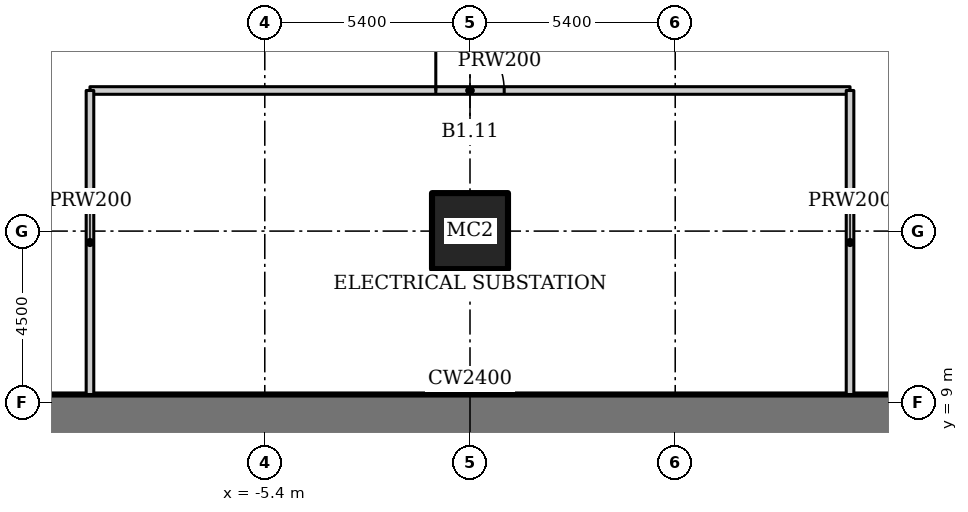
"""IFC4 building model, lengths in metres.
Left out: names, types, materials, properties, quantities, classifications, styles, units other than length and angle.
Written with IfcOpenShell. Run it as: python <this file> out.ifc"""

import sys

from ifc_helpers import new_model, si_unit, direction, frame, frame_2d, origin, origin_2d, place, context, subcontext, project, spatial, rectangle, hollow_rectangle, extrude, element, fill, save


model = new_model("IFC4")
c1 = context("Model", 3, precision=1e-05, world=origin(), true_north=direction((0.0, 1.0)))
c2 = subcontext(c1, "Body", "Model", "MODEL_VIEW")
j1 = project(units=[si_unit("LENGTHUNIT", "METRE"), si_unit("PLANEANGLEUNIT", "RADIAN")], contexts=[c1])
p1 = place(None, origin())
s1 = spatial("IfcSite", under=j1, at=p1, CompositionType="ELEMENT")
p2 = place(p1, origin())
s2 = spatial("IfcBuilding", under=s1, at=p2, CompositionType="ELEMENT")
p3 = place(p2, frame((0.0, 0.0, -5.5)))
s3 = spatial("IfcBuildingStorey", under=s2, at=p3, CompositionType="ELEMENT", Elevation=-5.5)
p4 = place(p3, frame((0.0, 13.5, 0.0), z_axis=(0.0, 0.0, 1.0), x_axis=(1.0, 0.0, 0.0)))
e1 = element("IfcColumn", 1, at=p4, inside=s3, PredefinedType="COLUMN", context=c2, shape_type="SweptSolid", body=[
    extrude(hollow_rectangle(XDim=2.0, YDim=2.0, WallThickness=0.17, at=origin_2d()), origin(), (0.0, 0.0, 1.0), 5.5),
])
p5 = place(p3, frame((12.2, 8.0, 0.0), z_axis=(0.0, 0.0, 1.0), x_axis=(-1.0, 0.0, 0.0)))
e2 = element("IfcWall", 2, at=p5, inside=s3, PredefinedType="SHEAR", context=c2, shape_type="SweptSolid", body=[
    extrude(rectangle(XDim=24.4, YDim=2.4, at=frame_2d((12.2, 0.0))), origin(), (0.0, 0.0, 1.0), 5.5),
])
p6 = place(p3, frame((-10.0, 17.2, 0.0), z_axis=(0.0, 0.0, 1.0), x_axis=(1.0, 0.0, 0.0)))
e3 = element("IfcWall", 3, at=p6, inside=s3, PredefinedType="SOLIDWALL", context=c2, shape_type="SweptSolid", body=[
    extrude(rectangle(XDim=20.0, YDim=0.2, at=frame_2d((10.0, 0.0))), origin(), (0.0, 0.0, 1.0), 5.05),
])
p7 = place(p6, frame((9.1, 0.0, 0.0)))
e4 = element("IfcOpeningElement", 4, at=p7, cuts=e3, PredefinedType="OPENING", context=c2, shape_type="SweptSolid", body=[
    extrude(rectangle(XDim=1.8, YDim=2.1, at=frame_2d((0.9, 1.05))), frame((0.0, 0.11, 0.0), z_axis=(0.0, -1.0, 0.0), x_axis=(1.0, 0.0, 0.0)), (0.0, 0.0, 1.0), 0.22),
])
for number, where, z_axis, x_axis in (
    (5, (-10.0, 9.2, 0.0), (0.0, 0.0, 1.0), (0.0, 1.0, 0.0)),
    (6, (10.0, 9.2, 0.0), (0.0, 0.0, 1.0), (0.0, 1.0, 0.0)),
):
    element("IfcWall", number, at=place(p3, frame(where, z_axis=z_axis, x_axis=x_axis)), inside=s3, PredefinedType="SOLIDWALL", context=c2, shape_type="SweptSolid", body=[
        extrude(rectangle(XDim=8.0, YDim=0.2, at=frame_2d((4.0, 0.0))), origin(), (0.0, 0.0, 1.0), 5.05),
    ])
p8 = place(p7, origin())
e7 = element("IfcDoor", 7, at=p8, inside=s3, OperationType="DOUBLE_DOOR_DOUBLE_SWING", PredefinedType="DOOR", context=c2, shape_type="SweptSolid", body=[
    extrude(rectangle(XDim=1.8, YDim=2.1, at=frame_2d((0.9, 1.05))), frame((0.0, 0.025, 0.0), z_axis=(0.0, -1.0, 0.0), x_axis=(1.0, 0.0, 0.0)), (0.0, 0.0, 1.0), 0.05),
])
fill(e4, e7)
save(model, sys.argv[1])
